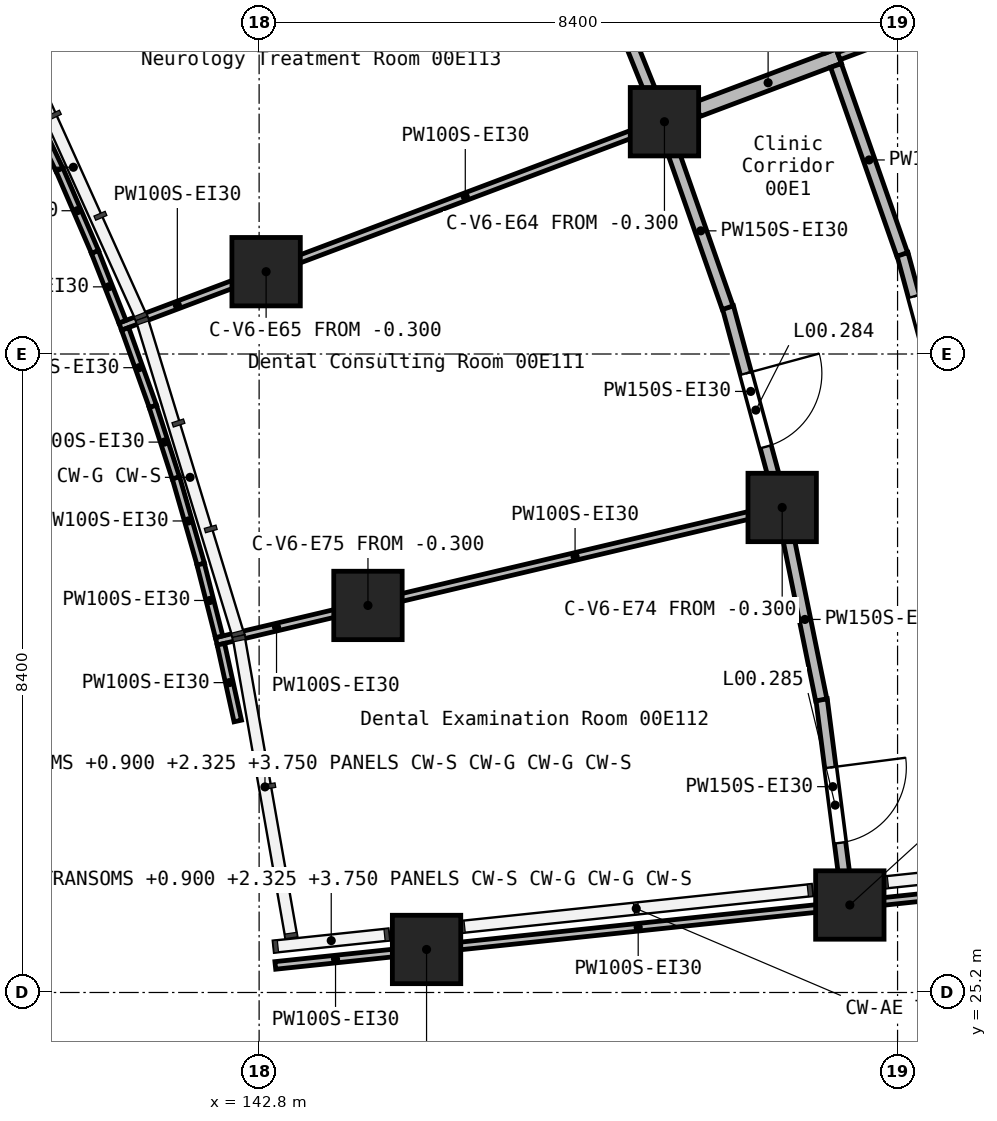
"""IFC4 building model, lengths in metres.
Left out: names, types, materials, properties, quantities, classifications, styles, units other than length and angle.
Written with IfcOpenShell. Run it as: python <this file> out.ifc"""

import sys

from ifc_helpers import new_model, si_unit, direction, frame, frame_2d, origin, origin_2d, place, context, subcontext, project, spatial, rectangle, extrude, element, fill, save


model = new_model("IFC4")
c1 = context("Model", 3, precision=1e-05, world=origin(), true_north=direction((0.0, 1.0)))
c2 = subcontext(c1, "Body", "Model", "MODEL_VIEW")
j1 = project(units=[si_unit("LENGTHUNIT", "METRE"), si_unit("PLANEANGLEUNIT", "RADIAN")], contexts=[c1])
p1 = place(None, origin())
s1 = spatial("IfcSite", under=j1, at=p1, CompositionType="ELEMENT")
p2 = place(p1, origin())
s2 = spatial("IfcBuilding", under=s1, at=p2, CompositionType="ELEMENT")
p3 = place(p2, origin())
s3 = spatial("IfcBuildingStorey", under=s2, at=p3, CompositionType="ELEMENT", Elevation=0.0)
for number, where, z_axis, x_axis in (
    (1, (142.892, 34.683, -0.3), (0.0, 0.0, 1.0), (1.0, 0.0, 0.0)),
    (2, (144.232, 30.292, -0.3), (0.0, 0.0, 1.0), (1.0, 0.0, 0.0)),
    (3, (145.003, 25.766, -0.3), (0.0, 0.0, 1.0), (1.0, 0.0, 0.0)),
    (4, (148.133, 36.656, -0.3), (0.0, 0.0, 1.0), (1.0, 0.0, 0.0)),
    (5, (149.682, 31.581, -0.3), (0.0, 0.0, 1.0), (1.0, 0.0, 0.0)),
    (6, (150.572, 26.351, -0.3), (0.0, 0.0, 1.0), (1.0, 0.0, 0.0)),
):
    element("IfcColumn", number, at=place(p3, frame(where, z_axis=z_axis, x_axis=x_axis)), inside=s3, PredefinedType="COLUMN", context=c2, shape_type="SweptSolid", body=[
        extrude(rectangle(XDim=0.9, YDim=0.9, at=origin_2d()), origin(), (0.0, 0.0, 1.0), 5.7),
    ])
p4 = place(p3, frame((148.567, 36.819, 0.0), z_axis=(0.0, 0.0, 1.0), x_axis=(0.935934561344, 0.352173958268, 0.0)))
e7 = element("IfcWall", 7, at=p4, inside=s3, PredefinedType="SOLIDWALL", context=c2, shape_type="SweptSolid", body=[
    extrude(rectangle(XDim=1.986, YDim=0.2, at=frame_2d((0.993, 0.0))), origin(), (0.0, 0.0, 1.0), 5.05),
])
p5 = place(p3, frame((151.264, 34.917, 0.0), z_axis=(0.0, 0.0, 1.0), x_axis=(0.261098222271, -0.965312238774, 0.0)))
e8 = element("IfcWall", 8, at=p5, inside=s3, PredefinedType="PARTITIONING", context=c2, shape_type="SweptSolid", body=[
    extrude(rectangle(XDim=2.958, YDim=0.15, at=frame_2d((1.479, 0.0))), origin(), (0.0, 0.0, 1.0), 5.05),
])
p6 = place(p5, frame((0.579, 0.0, 0.0)))
e9 = element("IfcOpeningElement", 9, at=p6, cuts=e8, PredefinedType="OPENING", context=c2, shape_type="SweptSolid", body=[
    extrude(rectangle(XDim=1.8, YDim=2.1, at=frame_2d((0.9, 1.05))), frame((0.0, 0.085, 0.0), z_axis=(0.0, -1.0, 0.0), x_axis=(1.0, 0.0, 0.0)), (0.0, 0.0, 1.0), 0.17),
])
p7 = place(p3, frame((149.333, 40.03, 0.0), z_axis=(0.0, 0.0, 1.0), x_axis=(0.373865497673, -0.927482932269, 0.0)))
e10 = element("IfcWall", 10, at=p7, inside=s3, PredefinedType="PARTITIONING", context=c2, shape_type="SweptSolid", body=[
    extrude(rectangle(XDim=2.635, YDim=0.15, at=frame_2d((1.317, 0.0))), origin(), (0.0, 0.0, 1.0), 5.05),
])
p8 = place(p3, frame((150.39, 37.396, 0.0), z_axis=(0.0, 0.0, 1.0), x_axis=(0.330759074405, -0.943715229663, 0.0)))
e11 = element("IfcWall", 11, at=p8, inside=s3, PredefinedType="PARTITIONING", context=c2, shape_type="SweptSolid", body=[
    extrude(rectangle(XDim=2.634, YDim=0.15, at=frame_2d((1.317, 0.0))), origin(), (0.0, 0.0, 1.0), 5.05),
])
p9 = place(p3, frame((148.969, 34.215, 0.0), z_axis=(0.0, 0.0, 1.0), x_axis=(0.26138863195, -0.965233641709, 0.0)))
e12 = element("IfcWall", 12, at=p9, inside=s3, PredefinedType="PARTITIONING", context=c2, shape_type="SweptSolid", body=[
    extrude(rectangle(XDim=2.295, YDim=0.15, at=frame_2d((1.147, 0.0))), origin(), (0.0, 0.0, 1.0), 5.05),
])
p10 = place(p9, frame((0.902, 0.0, 0.0)))
e13 = element("IfcOpeningElement", 13, at=p10, cuts=e12, PredefinedType="OPENING", context=c2, shape_type="SweptSolid", body=[
    extrude(rectangle(XDim=1.0, YDim=2.1, at=frame_2d((0.5, 1.05))), frame((0.0, 0.085, 0.0), z_axis=(0.0, -1.0, 0.0), x_axis=(1.0, 0.0, 0.0)), (0.0, 0.0, 1.0), 0.17),
])
p11 = place(p3, frame((150.2, 29.055, 0.0), z_axis=(0.0, 0.0, 1.0), x_axis=(0.127773812466, -0.991803333755, 0.0)))
e14 = element("IfcWall", 14, at=p11, inside=s3, PredefinedType="PARTITIONING", context=c2, shape_type="SweptSolid", body=[
    extrude(rectangle(XDim=2.314, YDim=0.15, at=frame_2d((1.157, 0.0))), origin(), (0.0, 0.0, 1.0), 5.05),
])
p12 = place(p11, frame((0.902, 0.0, 0.0)))
e15 = element("IfcOpeningElement", 15, at=p12, cuts=e14, PredefinedType="OPENING", context=c2, shape_type="SweptSolid", body=[
    extrude(rectangle(XDim=1.0, YDim=2.1, at=frame_2d((0.5, 1.05))), frame((0.0, 0.085, 0.0), z_axis=(0.0, -1.0, 0.0), x_axis=(1.0, 0.0, 0.0)), (0.0, 0.0, 1.0), 0.17),
])
p13 = place(p3, frame((147.145, 39.043, 0.0), z_axis=(0.0, 0.0, 1.0), x_axis=(0.373899406404, -0.927469263043, 0.0)))
e16 = element("IfcWall", 16, at=p13, inside=s3, PredefinedType="PARTITIONING", context=c2, shape_type="SweptSolid", body=[
    extrude(rectangle(XDim=2.113, YDim=0.15, at=frame_2d((1.057, 0.0))), origin(), (0.0, 0.0, 1.0), 5.05),
])
p14 = place(p3, frame((148.257, 36.232, 0.0), z_axis=(0.0, 0.0, 1.0), x_axis=(0.330477279651, -0.943813947574, 0.0)))
e17 = element("IfcWall", 17, at=p14, inside=s3, PredefinedType="PARTITIONING", context=c2, shape_type="SweptSolid", body=[
    extrude(rectangle(XDim=2.143, YDim=0.15, at=frame_2d((1.072, 0.0))), origin(), (0.0, 0.0, 1.0), 5.05),
])
p15 = place(p3, frame((149.766, 31.167, 0.0), z_axis=(0.0, 0.0, 1.0), x_axis=(0.199027700979, -0.97999386439, 0.0)))
e18 = element("IfcWall", 18, at=p15, inside=s3, PredefinedType="PARTITIONING", context=c2, shape_type="SweptSolid", body=[
    extrude(rectangle(XDim=2.16, YDim=0.15, at=frame_2d((1.08, 0.0))), origin(), (0.0, 0.0, 1.0), 5.05),
])
p16 = place(p3, frame((142.237, 29.82, 0.0), z_axis=(0.0, 0.0, 1.0), x_axis=(0.973152848226, 0.230159800984, 0.0)))
e19 = element("IfcWall", 19, at=p16, inside=s3, PredefinedType="PARTITIONING", context=c2, shape_type="SweptSolid", body=[
    extrude(rectangle(XDim=1.627, YDim=0.1, at=frame_2d((0.813, 0.0))), origin(), (0.0, 0.0, 1.0), 5.05),
])
p17 = place(p3, frame((144.643, 30.389, 0.0), z_axis=(0.0, 0.0, 1.0), x_axis=(0.973139038387, 0.230218183398, 0.0)))
e20 = element("IfcWall", 20, at=p17, inside=s3, PredefinedType="PARTITIONING", context=c2, shape_type="SweptSolid", body=[
    extrude(rectangle(XDim=4.755, YDim=0.1, at=frame_2d((2.377, 0.0))), origin(), (0.0, 0.0, 1.0), 5.05),
])
p18 = place(p3, frame((143.013, 25.556, 0.0), z_axis=(0.0, 0.0, 1.0), x_axis=(0.994495375694, 0.104780473964, 0.0)))
e21 = element("IfcWall", 21, at=p18, inside=s3, PredefinedType="PARTITIONING", context=c2, shape_type="SweptSolid", body=[
    extrude(rectangle(XDim=1.594, YDim=0.1, at=frame_2d((0.797, 0.0))), origin(), (0.0, 0.0, 1.0), 5.05),
])
p19 = place(p3, frame((145.408, 25.808, 0.0), z_axis=(0.0, 0.0, 1.0), x_axis=(0.994509645665, 0.104644945786, 0.0)))
e22 = element("IfcWall", 22, at=p19, inside=s3, PredefinedType="PARTITIONING", context=c2, shape_type="SweptSolid", body=[
    extrude(rectangle(XDim=4.785, YDim=0.1, at=frame_2d((2.393, 0.0))), origin(), (0.0, 0.0, 1.0), 5.05),
])
p20 = place(p3, frame((140.973, 33.96, 0.0), z_axis=(0.0, 0.0, 1.0), x_axis=(0.935890679388, 0.35229055655, 0.0)))
e23 = element("IfcWall", 23, at=p20, inside=s3, PredefinedType="PARTITIONING", context=c2, shape_type="SweptSolid", body=[
    extrude(rectangle(XDim=1.604, YDim=0.1, at=frame_2d((0.802, 0.0))), origin(), (0.0, 0.0, 1.0), 5.05),
])
p21 = place(p3, frame((143.309, 34.84, 0.0), z_axis=(0.0, 0.0, 1.0), x_axis=(0.935891610639, 0.352288082591, 0.0)))
e24 = element("IfcWall", 24, at=p21, inside=s3, PredefinedType="PARTITIONING", context=c2, shape_type="SweptSolid", body=[
    extrude(rectangle(XDim=4.708, YDim=0.1, at=frame_2d((2.354, 0.0))), origin(), (0.0, 0.0, 1.0), 5.05),
])
p22 = place(p3, frame((150.427, 37.519, 0.0), z_axis=(0.0, 0.0, 1.0), x_axis=(0.935894141782, 0.352281358262, 0.0)))
e25 = element("IfcWall", 25, at=p22, inside=s3, PredefinedType="PARTITIONING", context=c2, shape_type="SweptSolid", body=[
    extrude(rectangle(XDim=2.703, YDim=0.1, at=frame_2d((1.352, 0.0))), origin(), (0.0, 0.0, 1.0), 5.05),
])
p23 = place(p3, frame((150.977, 26.394, 0.0), z_axis=(0.0, 0.0, 1.0), x_axis=(0.99450757419, 0.104664630505, 0.0)))
e26 = element("IfcWall", 26, at=p23, inside=s3, PredefinedType="PARTITIONING", context=c2, shape_type="SweptSolid", body=[
    extrude(rectangle(XDim=1.892, YDim=0.1, at=frame_2d((0.946, 0.0))), origin(), (0.0, 0.0, 1.0), 5.05),
])
p24 = place(p3, frame((141.705, 31.973, 0.0), z_axis=(0.0, 0.0, 1.0), x_axis=(0.276407300439, -0.961040584088, 0.0)))
e27 = element("IfcWall", 27, at=p24, inside=s3, PredefinedType="PARTITIONING", context=c2, shape_type="SweptSolid", body=[
    extrude(rectangle(XDim=1.185, YDim=0.1, at=frame_2d((0.593, 0.0))), origin(), (0.0, 0.0, 1.0), 5.05),
])
p25 = place(p3, frame((140.172, 36.029, 0.0), z_axis=(0.0, 0.0, 1.0), x_axis=(0.396479436871, -0.918043602526, 0.0)))
e28 = element("IfcWall", 28, at=p25, inside=s3, PredefinedType="PARTITIONING", context=c2, shape_type="SweptSolid", body=[
    extrude(rectangle(XDim=1.185, YDim=0.1, at=frame_2d((0.592, 0.0))), origin(), (0.0, 0.0, 1.0), 5.05),
])
p26 = place(p3, frame((140.64, 34.942, 0.0), z_axis=(0.0, 0.0, 1.0), x_axis=(0.366901413892, -0.93025983063, 0.0)))
e29 = element("IfcWall", 29, at=p26, inside=s3, PredefinedType="PARTITIONING", context=c2, shape_type="SweptSolid", body=[
    extrude(rectangle(XDim=0.986, YDim=0.1, at=frame_2d((0.493, 0.0))), origin(), (0.0, 0.0, 1.0), 5.05),
])
p27 = place(p3, frame((141.037, 33.93, 0.0), z_axis=(0.0, 0.0, 1.0), x_axis=(0.337434932816, -0.941348854631, 0.0)))
e30 = element("IfcWall", 30, at=p27, inside=s3, PredefinedType="PARTITIONING", context=c2, shape_type="SweptSolid", body=[
    extrude(rectangle(XDim=1.084, YDim=0.1, at=frame_2d((0.542, 0.0))), origin(), (0.0, 0.0, 1.0), 5.05),
])
p28 = place(p3, frame((141.401, 32.911, 0.0), z_axis=(0.0, 0.0, 1.0), x_axis=(0.307089469025, -0.951680649175, 0.0)))
e31 = element("IfcWall", 31, at=p28, inside=s3, PredefinedType="PARTITIONING", context=c2, shape_type="SweptSolid", body=[
    extrude(rectangle(XDim=0.987, YDim=0.1, at=frame_2d((0.494, 0.0))), origin(), (0.0, 0.0, 1.0), 5.05),
])
p29 = place(p3, frame((142.031, 30.835, 0.0), z_axis=(0.0, 0.0, 1.0), x_axis=(0.246091023995, -0.969246721898, 0.0)))
e32 = element("IfcWall", 32, at=p29, inside=s3, PredefinedType="PARTITIONING", context=c2, shape_type="SweptSolid", body=[
    extrude(rectangle(XDim=0.985, YDim=0.1, at=frame_2d((0.493, 0.0))), origin(), (0.0, 0.0, 1.0), 5.05),
])
p30 = place(p3, frame((139.751, 36.92, 0.0), z_axis=(0.0, 0.0, 1.0), x_axis=(0.426023266387, -0.904712206448, 0.0)))
e33 = element("IfcWall", 33, at=p30, inside=s3, PredefinedType="PARTITIONING", context=c2, shape_type="SweptSolid", body=[
    extrude(rectangle(XDim=0.987, YDim=0.1, at=frame_2d((0.494, 0.0))), origin(), (0.0, 0.0, 1.0), 5.05),
])
p31 = place(p3, frame((142.297, 29.781, 0.0), z_axis=(0.0, 0.0, 1.0), x_axis=(0.214929366895, -0.976629595725, 0.0)))
e34 = element("IfcWall", 34, at=p31, inside=s3, PredefinedType="PARTITIONING", context=c2, shape_type="SweptSolid", body=[
    extrude(rectangle(XDim=1.034, YDim=0.1, at=frame_2d((0.517, 0.0))), origin(), (0.0, 0.0, 1.0), 5.05),
])
p32 = place(p6, frame((1.8, 0.0, 0.0), z_axis=(0.0, 0.0, 1.0), x_axis=(-1.0, 0.0, 0.0)))
e35 = element("IfcDoor", 35, at=p32, inside=s3, OperationType="DOUBLE_DOOR_SINGLE_SWING", PredefinedType="DOOR", context=c2, shape_type="SweptSolid", body=[
    extrude(rectangle(XDim=1.8, YDim=2.1, at=frame_2d((0.9, 1.05))), frame((0.0, 0.025, 0.0), z_axis=(0.0, -1.0, 0.0), x_axis=(1.0, 0.0, 0.0)), (0.0, 0.0, 1.0), 0.05),
])
fill(e9, e35)
p33 = place(p10, frame((1.0, 0.0, 0.0), z_axis=(0.0, 0.0, 1.0), x_axis=(-1.0, 0.0, 0.0)))
e36 = element("IfcDoor", 36, at=p33, inside=s3, OperationType="SINGLE_SWING_LEFT", PredefinedType="DOOR", context=c2, shape_type="SweptSolid", body=[
    extrude(rectangle(XDim=1.0, YDim=2.1, at=frame_2d((0.5, 1.05))), frame((0.0, 0.025, 0.0), z_axis=(0.0, -1.0, 0.0), x_axis=(1.0, 0.0, 0.0)), (0.0, 0.0, 1.0), 0.05),
])
fill(e13, e36)
p34 = place(p12, frame((1.0, 0.0, 0.0), z_axis=(0.0, 0.0, 1.0), x_axis=(-1.0, 0.0, 0.0)))
e37 = element("IfcDoor", 37, at=p34, inside=s3, OperationType="SINGLE_SWING_LEFT", PredefinedType="DOOR", context=c2, shape_type="SweptSolid", body=[
    extrude(rectangle(XDim=1.0, YDim=2.1, at=frame_2d((0.5, 1.05))), frame((0.0, 0.025, 0.0), z_axis=(0.0, -1.0, 0.0), x_axis=(1.0, 0.0, 0.0)), (0.0, 0.0, 1.0), 0.05),
])
fill(e15, e37)
save(model, sys.argv[1])
